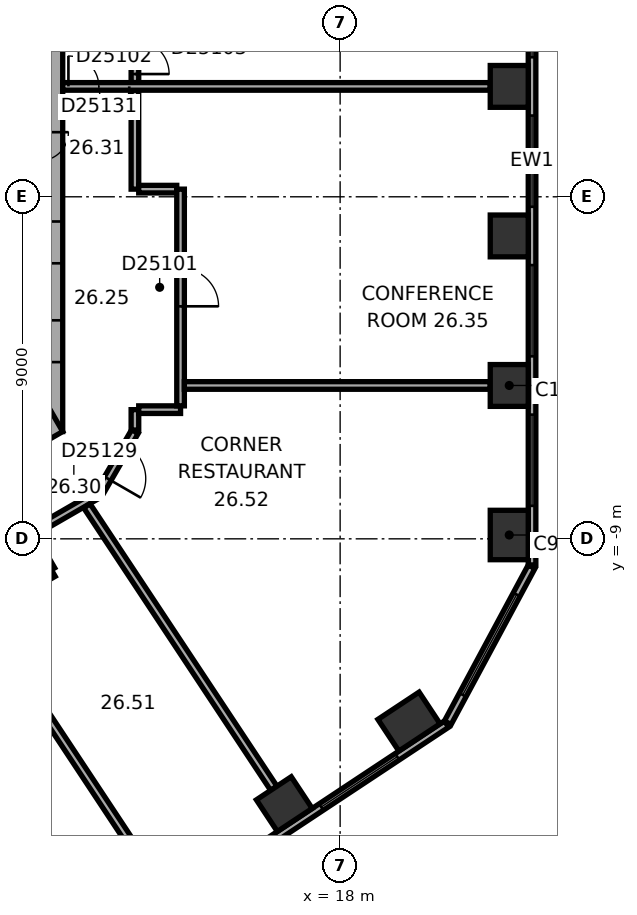
"""IFC4 building model, lengths in metres.
Left out: names, types, materials, properties, quantities, classifications, styles, units other than length and angle.
Written with IfcOpenShell. Run it as: python <this file> out.ifc"""

import sys

from ifc_helpers import new_model, si_unit, direction, frame, frame_2d, origin, origin_2d, place, context, subcontext, project, spatial, rectangle, extrude, element, fill, save


model = new_model("IFC4")
c1 = context("Model", 3, precision=1e-05, world=origin(), true_north=direction((0.0, 1.0)))
c2 = subcontext(c1, "Body", "Model", "MODEL_VIEW")
j1 = project(units=[si_unit("LENGTHUNIT", "METRE"), si_unit("PLANEANGLEUNIT", "RADIAN")], contexts=[c1])
p1 = place(None, origin())
s1 = spatial("IfcSite", under=j1, at=p1, CompositionType="ELEMENT")
p2 = place(p1, origin())
s2 = spatial("IfcBuilding", under=s1, at=p2, CompositionType="ELEMENT")
p3 = place(p2, frame((0.0, 0.0, 110.0)))
s3 = spatial("IfcBuildingStorey", under=s2, at=p3, CompositionType="ELEMENT", Elevation=110.0)
p4 = place(p3, frame((22.45, -8.899, 0.0), z_axis=(0.0, 0.0, 1.0), x_axis=(0.0, 1.0, 0.0)))
e1 = element("IfcColumn", 1, at=p4, inside=s3, PredefinedType="COLUMN", context=c2, shape_type="SweptSolid", body=[
    extrude(rectangle(XDim=1.3, YDim=1.0, at=origin_2d()), origin(), (0.0, 0.0, 1.0), 3.3),
])
for number, where, z_axis, x_axis in (
    (2, (22.45, -4.965, 0.0), (0.0, 0.0, 1.0), (0.0, 1.0, 0.0)),
    (3, (22.45, -1.03, 0.0), (0.0, 0.0, 1.0), (0.0, 1.0, 0.0)),
    (4, (22.45, 2.905, 0.0), (0.0, 0.0, 1.0), (0.0, 1.0, 0.0)),
    (5, (16.531, -15.981, 0.0), (0.0, 0.0, 1.0), (0.834, 0.552, 0.0)),
):
    element("IfcColumn", number, at=place(p3, frame(where, z_axis=z_axis, x_axis=x_axis)), inside=s3, PredefinedType="COLUMN", context=c2, shape_type="SweptSolid", body=[
        extrude(rectangle(XDim=1.1, YDim=1.0, at=origin_2d()), origin(), (0.0, 0.0, 1.0), 3.3),
    ])
p5 = place(p3, frame((19.812, -13.809, 0.0), z_axis=(0.0, 0.0, 1.0), x_axis=(0.833885822067, 0.551936985312, 0.0)))
e6 = element("IfcColumn", 6, at=p5, inside=s3, PredefinedType="COLUMN", context=c2, shape_type="SweptSolid", body=[
    extrude(rectangle(XDim=1.3, YDim=1.0, at=origin_2d()), origin(), (0.0, 0.0, 1.0), 3.3),
])
p6 = place(p3, frame((10.1, -6.177, 0.0), z_axis=(0.0, 0.0, 1.0), x_axis=(0.0, 1.0, 0.0)))
e7 = element("IfcWall", 7, at=p6, inside=s3, PredefinedType="SHEAR", context=c2, shape_type="SweptSolid", body=[
    extrude(rectangle(XDim=12.355, YDim=1.2, at=frame_2d((6.177, 0.0))), origin(), (0.0, 0.0, 1.0), 3.3),
])
p7 = place(p6, frame((6.378, 0.0, 0.0)))
e8 = element("IfcOpeningElement", 8, at=p7, cuts=e7, PredefinedType="OPENING", context=c2, shape_type="SweptSolid", body=[
    extrude(rectangle(XDim=1.5, YDim=2.1, at=frame_2d((0.75, 1.05))), frame((0.0, 0.61, 0.0), z_axis=(0.0, -1.0, 0.0), x_axis=(1.0, 0.0, 0.0)), (0.0, 0.0, 1.0), 1.22),
])
p8 = place(p6, frame((1.828, 0.0, 0.0)))
e9 = element("IfcOpeningElement", 9, at=p8, cuts=e7, PredefinedType="OPENING", context=c2, shape_type="SweptSolid", body=[
    extrude(rectangle(XDim=1.1, YDim=2.1, at=frame_2d((0.55, 1.05))), frame((0.0, 0.61, 0.0), z_axis=(0.0, -1.0, 0.0), x_axis=(1.0, 0.0, 0.0)), (0.0, 0.0, 1.0), 1.22),
])
p9 = place(p6, frame((4.427, 0.0, 0.0)))
e10 = element("IfcOpeningElement", 10, at=p9, cuts=e7, PredefinedType="OPENING", context=c2, shape_type="SweptSolid", body=[
    extrude(rectangle(XDim=1.1, YDim=2.1, at=frame_2d((0.55, 1.05))), frame((0.0, 0.61, 0.0), z_axis=(0.0, -1.0, 0.0), x_axis=(1.0, 0.0, 0.0)), (0.0, 0.0, 1.0), 1.22),
])
p10 = place(p3, frame((-0.3, -11.836, 0.0), z_axis=(0.0, 0.0, 1.0), x_axis=(0.866021384402, 0.500006961711, 0.0)))
e11 = element("IfcWall", 11, at=p10, inside=s3, PredefinedType="SHEAR", context=c2, shape_type="SweptSolid", body=[
    extrude(rectangle(XDim=12.355, YDim=1.2, at=frame_2d((6.178, 0.0))), origin(), (0.0, 0.0, 1.0), 3.3),
])
p11 = place(p10, frame((4.128, 0.0, 0.0)))
e12 = element("IfcOpeningElement", 12, at=p11, cuts=e11, PredefinedType="OPENING", context=c2, shape_type="SweptSolid", body=[
    extrude(rectangle(XDim=0.9, YDim=2.1, at=frame_2d((0.45, 1.05))), frame((0.0, 0.61, 0.0), z_axis=(0.0, -1.0, 0.0), x_axis=(1.0, 0.0, 0.0)), (0.0, 0.0, 1.0), 1.22),
])
p12 = place(p10, frame((7.928, 0.0, 0.0)))
e13 = element("IfcOpeningElement", 13, at=p12, cuts=e11, PredefinedType="OPENING", context=c2, shape_type="SweptSolid", body=[
    extrude(rectangle(XDim=1.1, YDim=2.1, at=frame_2d((0.55, 1.05))), frame((0.0, 0.61, 0.0), z_axis=(0.0, -1.0, 0.0), x_axis=(1.0, 0.0, 0.0)), (0.0, 0.0, 1.0), 1.22),
])
p13 = place(p3, frame((23.05, -9.687, 0.0), z_axis=(0.0, 0.0, 1.0), x_axis=(0.0, 1.0, 0.0)))
e14 = element("IfcWall", 14, at=p13, inside=s3, PredefinedType="STANDARD", context=c2, shape_type="SweptSolid", body=[
    extrude(rectangle(XDim=21.246, YDim=0.2, at=frame_2d((10.623, 0.0))), origin(), (0.0, 0.0, 1.0), 3.3),
])
p14 = place(p13, frame((1.555, 0.0, 0.8)))
e15 = element("IfcOpeningElement", 15, at=p14, cuts=e14, PredefinedType="OPENING", context=c2, shape_type="SweptSolid", body=[
    extrude(rectangle(XDim=2.4, YDim=1.7, at=frame_2d((1.2, 0.85))), frame((0.0, 0.11, 0.0), z_axis=(0.0, -1.0, 0.0), x_axis=(1.0, 0.0, 0.0)), (0.0, 0.0, 1.0), 0.22),
])
p15 = place(p13, frame((5.489, 0.0, 0.8)))
e16 = element("IfcOpeningElement", 16, at=p15, cuts=e14, PredefinedType="OPENING", context=c2, shape_type="SweptSolid", body=[
    extrude(rectangle(XDim=2.4, YDim=1.7, at=frame_2d((1.2, 0.85))), frame((0.0, 0.11, 0.0), z_axis=(0.0, -1.0, 0.0), x_axis=(1.0, 0.0, 0.0)), (0.0, 0.0, 1.0), 0.22),
])
p16 = place(p13, frame((9.424, 0.0, 0.8)))
e17 = element("IfcOpeningElement", 17, at=p16, cuts=e14, PredefinedType="OPENING", context=c2, shape_type="SweptSolid", body=[
    extrude(rectangle(XDim=2.4, YDim=1.7, at=frame_2d((1.2, 0.85))), frame((0.0, 0.11, 0.0), z_axis=(0.0, -1.0, 0.0), x_axis=(1.0, 0.0, 0.0)), (0.0, 0.0, 1.0), 0.22),
])
p17 = place(p13, frame((13.358, 0.0, 0.8)))
e18 = element("IfcOpeningElement", 18, at=p17, cuts=e14, PredefinedType="OPENING", context=c2, shape_type="SweptSolid", body=[
    extrude(rectangle(XDim=2.4, YDim=1.7, at=frame_2d((1.2, 0.85))), frame((0.0, 0.11, 0.0), z_axis=(0.0, -1.0, 0.0), x_axis=(1.0, 0.0, 0.0)), (0.0, 0.0, 1.0), 0.22),
])
p18 = place(p13, frame((17.293, 0.0, 0.8)))
e19 = element("IfcOpeningElement", 19, at=p18, cuts=e14, PredefinedType="OPENING", context=c2, shape_type="SweptSolid", body=[
    extrude(rectangle(XDim=2.4, YDim=1.7, at=frame_2d((1.2, 0.85))), frame((0.0, 0.11, 0.0), z_axis=(0.0, -1.0, 0.0), x_axis=(1.0, 0.0, 0.0)), (0.0, 0.0, 1.0), 0.22),
])
p19 = place(p3, frame((3.083, -25.601, 0.0), z_axis=(0.0, 0.0, 1.0), x_axis=(0.833884295743, 0.551939291329, 0.0)))
e20 = element("IfcWall", 20, at=p19, inside=s3, PredefinedType="STANDARD", context=c2, shape_type="SweptSolid", body=[
    extrude(rectangle(XDim=21.246, YDim=0.2, at=frame_2d((10.623, 0.0))), origin(), (0.0, 0.0, 1.0), 3.3),
])
p20 = place(p19, frame((1.553, 0.0, 0.8)))
e21 = element("IfcOpeningElement", 21, at=p20, cuts=e20, PredefinedType="OPENING", context=c2, shape_type="SweptSolid", body=[
    extrude(rectangle(XDim=2.4, YDim=1.7, at=frame_2d((1.2, 0.85))), frame((0.0, 0.11, 0.0), z_axis=(0.0, -1.0, 0.0), x_axis=(1.0, 0.0, 0.0)), (0.0, 0.0, 1.0), 0.22),
])
p21 = place(p19, frame((5.488, 0.0, 0.8)))
e22 = element("IfcOpeningElement", 22, at=p21, cuts=e20, PredefinedType="OPENING", context=c2, shape_type="SweptSolid", body=[
    extrude(rectangle(XDim=2.4, YDim=1.7, at=frame_2d((1.2, 0.85))), frame((0.0, 0.11, 0.0), z_axis=(0.0, -1.0, 0.0), x_axis=(1.0, 0.0, 0.0)), (0.0, 0.0, 1.0), 0.22),
])
p22 = place(p19, frame((9.422, 0.0, 0.8)))
e23 = element("IfcOpeningElement", 23, at=p22, cuts=e20, PredefinedType="OPENING", context=c2, shape_type="SweptSolid", body=[
    extrude(rectangle(XDim=2.4, YDim=1.7, at=frame_2d((1.2, 0.85))), frame((0.0, 0.11, 0.0), z_axis=(0.0, -1.0, 0.0), x_axis=(1.0, 0.0, 0.0)), (0.0, 0.0, 1.0), 0.22),
])
p23 = place(p19, frame((13.357, 0.0, 0.8)))
e24 = element("IfcOpeningElement", 24, at=p23, cuts=e20, PredefinedType="OPENING", context=c2, shape_type="SweptSolid", body=[
    extrude(rectangle(XDim=2.4, YDim=1.7, at=frame_2d((1.2, 0.85))), frame((0.0, 0.11, 0.0), z_axis=(0.0, -1.0, 0.0), x_axis=(1.0, 0.0, 0.0)), (0.0, 0.0, 1.0), 0.22),
])
p24 = place(p19, frame((17.291, 0.0, 0.8)))
e25 = element("IfcOpeningElement", 25, at=p24, cuts=e20, PredefinedType="OPENING", context=c2, shape_type="SweptSolid", body=[
    extrude(rectangle(XDim=2.4, YDim=1.7, at=frame_2d((1.2, 0.85))), frame((0.0, 0.11, 0.0), z_axis=(0.0, -1.0, 0.0), x_axis=(1.0, 0.0, 0.0)), (0.0, 0.0, 1.0), 0.22),
])
p25 = place(p3, frame((20.833, -13.839, 0.0), z_axis=(0.0, 0.0, 1.0), x_axis=(0.473321668581, 0.880889662813, 0.0)))
e26 = element("IfcWall", 26, at=p25, inside=s3, PredefinedType="STANDARD", context=c2, shape_type="SweptSolid", body=[
    extrude(rectangle(XDim=4.66, YDim=0.2, at=frame_2d((2.33, 0.0))), origin(), (0.0, 0.0, 1.0), 3.3),
])
p26 = place(p25, frame((0.83, 0.0, 0.8)))
e27 = element("IfcOpeningElement", 27, at=p26, cuts=e26, PredefinedType="OPENING", context=c2, shape_type="SweptSolid", body=[
    extrude(rectangle(XDim=3.0, YDim=1.7, at=frame_2d((1.5, 0.85))), frame((0.0, 0.11, 0.0), z_axis=(0.0, -1.0, 0.0), x_axis=(1.0, 0.0, 0.0)), (0.0, 0.0, 1.0), 0.22),
])
p27 = place(p3, frame((7.419, -11.653, 0.0), z_axis=(0.0, 0.0, 1.0), x_axis=(0.866038154057, 0.49997791523, 0.0)))
e28 = element("IfcWall", 28, at=p27, inside=s3, PredefinedType="PARTITIONING", context=c2, shape_type="SweptSolid", body=[
    extrude(rectangle(XDim=3.502, YDim=0.2, at=frame_2d((1.751, 0.0))), origin(), (0.0, 0.0, 1.0), 3.05),
])
p28 = place(p27, frame((1.94, 0.0, 0.0)))
e29 = element("IfcOpeningElement", 29, at=p28, cuts=e28, PredefinedType="OPENING", context=c2, shape_type="SweptSolid", body=[
    extrude(rectangle(XDim=0.9, YDim=2.1, at=frame_2d((0.45, 1.05))), frame((0.0, 0.11, 0.0), z_axis=(0.0, -1.0, 0.0), x_axis=(1.0, 0.0, 0.0)), (0.0, 0.0, 1.0), 0.22),
])
p29 = place(p3, frame((9.852, -8.861, 0.0), z_axis=(0.0, 0.0, 1.0), x_axis=(0.866013291437, 0.500020978615, 0.0)))
e30 = element("IfcWall", 30, at=p29, inside=s3, PredefinedType="PARTITIONING", context=c2, shape_type="SweptSolid", body=[
    extrude(rectangle(XDim=2.077, YDim=0.2, at=frame_2d((1.038, 0.0))), origin(), (0.0, 0.0, 1.0), 3.05),
])
p30 = place(p3, frame((10.402, -9.815, 0.0), z_axis=(0.0, 0.0, 1.0), x_axis=(-0.499968756647, 0.866043441391, 0.0)))
e31 = element("IfcWall", 31, at=p30, inside=s3, PredefinedType="PARTITIONING", context=c2, shape_type="SweptSolid", body=[
    extrude(rectangle(XDim=1.001, YDim=0.2, at=frame_2d((0.5, 0.0))), origin(), (0.0, 0.0, 1.0), 3.05),
])
p31 = place(p3, frame((11.67, -7.788, 0.0), z_axis=(0.0, 0.0, 1.0), x_axis=(0.500063286585, 0.865988862174, 0.0)))
e32 = element("IfcWall", 32, at=p31, inside=s3, PredefinedType="PARTITIONING", context=c2, shape_type="SweptSolid", body=[
    extrude(rectangle(XDim=1.86, YDim=0.2, at=frame_2d((0.93, 0.0))), origin(), (0.0, 0.0, 1.0), 3.05),
])
p32 = place(p31, frame((0.43, 0.0, 0.0)))
e33 = element("IfcOpeningElement", 33, at=p32, cuts=e32, PredefinedType="OPENING", context=c2, shape_type="SweptSolid", body=[
    extrude(rectangle(XDim=1.0, YDim=2.1, at=frame_2d((0.5, 1.05))), frame((0.0, 0.11, 0.0), z_axis=(0.0, -1.0, 0.0), x_axis=(1.0, 0.0, 0.0)), (0.0, 0.0, 1.0), 0.22),
])
p33 = place(p3, frame((12.6, -6.138, 0.0), z_axis=(0.0, 0.0, 1.0), x_axis=(0.0, 1.0, 0.0)))
e34 = element("IfcWall", 34, at=p33, inside=s3, PredefinedType="PARTITIONING", context=c2, shape_type="SweptSolid", body=[
    extrude(rectangle(XDim=0.537, YDim=0.2, at=frame_2d((0.268, 0.0))), origin(), (0.0, 0.0, 1.0), 3.05),
])
p34 = place(p3, frame((12.6, 0.201, 0.0), z_axis=(0.0, 0.0, 1.0), x_axis=(0.0, 1.0, 0.0)))
e35 = element("IfcWall", 35, at=p34, inside=s3, PredefinedType="PARTITIONING", context=c2, shape_type="SweptSolid", body=[
    extrude(rectangle(XDim=2.604, YDim=0.2, at=frame_2d((1.302, 0.0))), origin(), (0.0, 0.0, 1.0), 3.05),
])
p35 = place(p3, frame((12.6, 3.004, 0.0), z_axis=(0.0, 0.0, 1.0), x_axis=(0.0, 1.0, 0.0)))
e36 = element("IfcWall", 36, at=p35, inside=s3, PredefinedType="PARTITIONING", context=c2, shape_type="SweptSolid", body=[
    extrude(rectangle(XDim=3.173, YDim=0.2, at=frame_2d((1.586, 0.0))), origin(), (0.0, 0.0, 1.0), 3.05),
])
p36 = place(p35, frame((0.225, 0.0, 0.0)))
e37 = element("IfcOpeningElement", 37, at=p36, cuts=e36, PredefinedType="OPENING", context=c2, shape_type="SweptSolid", body=[
    extrude(rectangle(XDim=0.9, YDim=2.1, at=frame_2d((0.45, 1.05))), frame((0.0, 0.11, 0.0), z_axis=(0.0, -1.0, 0.0), x_axis=(1.0, 0.0, 0.0)), (0.0, 0.0, 1.0), 0.22),
])
p37 = place(p3, frame((12.7, -5.601, 0.0), z_axis=(0.0, 0.0, 1.0), x_axis=(1.0, 0.0, 0.0)))
e38 = element("IfcWall", 38, at=p37, inside=s3, PredefinedType="PARTITIONING", context=c2, shape_type="SweptSolid", body=[
    extrude(rectangle(XDim=1.101, YDim=0.2, at=frame_2d((0.551, 0.0))), origin(), (0.0, 0.0, 1.0), 3.05),
])
p38 = place(p3, frame((12.974, -17.735, 0.0), z_axis=(0.0, 0.0, 1.0), x_axis=(-0.55192625685, 0.833892922982, 0.0)))
e39 = element("IfcWall", 39, at=p38, inside=s3, PredefinedType="PARTITIONING", context=c2, shape_type="SweptSolid", body=[
    extrude(rectangle(XDim=7.95, YDim=0.2, at=frame_2d((3.975, 0.0))), origin(), (0.0, 0.0, 1.0), 3.05),
])
p39 = place(p3, frame((13.701, 0.201, 0.0), z_axis=(0.0, 0.0, 1.0), x_axis=(-1.0, 0.0, 0.0)))
e40 = element("IfcWall", 40, at=p39, inside=s3, PredefinedType="PARTITIONING", context=c2, shape_type="SweptSolid", body=[
    extrude(rectangle(XDim=1.001, YDim=0.2, at=frame_2d((0.5, 0.0))), origin(), (0.0, 0.0, 1.0), 3.05),
])
p40 = place(p3, frame((13.801, -5.501, 0.0), z_axis=(0.0, 0.0, 1.0), x_axis=(0.0, 1.0, 0.0)))
e41 = element("IfcWall", 41, at=p40, inside=s3, PredefinedType="PARTITIONING", context=c2, shape_type="SweptSolid", body=[
    extrude(rectangle(XDim=5.702, YDim=0.2, at=frame_2d((2.851, 0.0))), origin(), (0.0, 0.0, 1.0), 3.05),
])
p41 = place(p40, frame((2.619, 0.0, 0.0)))
e42 = element("IfcOpeningElement", 42, at=p41, cuts=e41, PredefinedType="OPENING", context=c2, shape_type="SweptSolid", body=[
    extrude(rectangle(XDim=1.0, YDim=2.1, at=frame_2d((0.5, 1.05))), frame((0.0, 0.11, 0.0), z_axis=(0.0, -1.0, 0.0), x_axis=(1.0, 0.0, 0.0)), (0.0, 0.0, 1.0), 0.22),
])
p42 = place(p3, frame((13.901, -4.965, 0.0), z_axis=(0.0, 0.0, 1.0), x_axis=(1.0, 0.0, 0.0)))
e43 = element("IfcWall", 43, at=p42, inside=s3, PredefinedType="PARTITIONING", context=c2, shape_type="SweptSolid", body=[
    extrude(rectangle(XDim=8.049, YDim=0.2, at=frame_2d((4.024, 0.0))), origin(), (0.0, 0.0, 1.0), 3.05),
])
p43 = place(p3, frame((16.255, -15.564, 0.0), z_axis=(0.0, 0.0, 1.0), x_axis=(-0.55192208744, 0.833895682562, 0.0)))
e44 = element("IfcWall", 44, at=p43, inside=s3, PredefinedType="PARTITIONING", context=c2, shape_type="SweptSolid", body=[
    extrude(rectangle(XDim=8.913, YDim=0.2, at=frame_2d((4.457, 0.0))), origin(), (0.0, 0.0, 1.0), 2.6),
])
p44 = place(p3, frame((21.95, 2.905, 0.0), z_axis=(0.0, 0.0, 1.0), x_axis=(-1.0, 0.0, 0.0)))
e45 = element("IfcWall", 45, at=p44, inside=s3, PredefinedType="PARTITIONING", context=c2, shape_type="SweptSolid", body=[
    extrude(rectangle(XDim=11.25, YDim=0.2, at=frame_2d((5.625, 0.0))), origin(), (0.0, 0.0, 1.0), 3.05),
])
p45 = place(p44, frame((9.5, 0.0, 0.0)))
e46 = element("IfcOpeningElement", 46, at=p45, cuts=e45, PredefinedType="OPENING", context=c2, shape_type="SweptSolid", body=[
    extrude(rectangle(XDim=1.6, YDim=2.1, at=frame_2d((0.8, 1.05))), frame((0.0, 0.11, 0.0), z_axis=(0.0, -1.0, 0.0), x_axis=(1.0, 0.0, 0.0)), (0.0, 0.0, 1.0), 0.22),
])
p46 = place(p14, origin())
e47 = element("IfcWindow", 47, at=p46, inside=s3, PartitioningType="SINGLE_PANEL", PredefinedType="WINDOW", context=c2, shape_type="SweptSolid", body=[
    extrude(rectangle(XDim=2.4, YDim=1.7, at=frame_2d((1.2, 0.85))), frame((0.0, 0.03, 0.0), z_axis=(0.0, -1.0, 0.0), x_axis=(1.0, 0.0, 0.0)), (0.0, 0.0, 1.0), 0.06),
])
fill(e15, e47)
p47 = place(p15, origin())
e48 = element("IfcWindow", 48, at=p47, inside=s3, PartitioningType="SINGLE_PANEL", PredefinedType="WINDOW", context=c2, shape_type="SweptSolid", body=[
    extrude(rectangle(XDim=2.4, YDim=1.7, at=frame_2d((1.2, 0.85))), frame((0.0, 0.03, 0.0), z_axis=(0.0, -1.0, 0.0), x_axis=(1.0, 0.0, 0.0)), (0.0, 0.0, 1.0), 0.06),
])
fill(e16, e48)
p48 = place(p16, origin())
e49 = element("IfcWindow", 49, at=p48, inside=s3, PartitioningType="SINGLE_PANEL", PredefinedType="WINDOW", context=c2, shape_type="SweptSolid", body=[
    extrude(rectangle(XDim=2.4, YDim=1.7, at=frame_2d((1.2, 0.85))), frame((0.0, 0.03, 0.0), z_axis=(0.0, -1.0, 0.0), x_axis=(1.0, 0.0, 0.0)), (0.0, 0.0, 1.0), 0.06),
])
fill(e17, e49)
p49 = place(p17, origin())
e50 = element("IfcWindow", 50, at=p49, inside=s3, PartitioningType="SINGLE_PANEL", PredefinedType="WINDOW", context=c2, shape_type="SweptSolid", body=[
    extrude(rectangle(XDim=2.4, YDim=1.7, at=frame_2d((1.2, 0.85))), frame((0.0, 0.03, 0.0), z_axis=(0.0, -1.0, 0.0), x_axis=(1.0, 0.0, 0.0)), (0.0, 0.0, 1.0), 0.06),
])
fill(e18, e50)
p50 = place(p24, origin())
e51 = element("IfcWindow", 51, at=p50, inside=s3, PartitioningType="SINGLE_PANEL", PredefinedType="WINDOW", context=c2, shape_type="SweptSolid", body=[
    extrude(rectangle(XDim=2.4, YDim=1.7, at=frame_2d((1.2, 0.85))), frame((0.0, 0.03, 0.0), z_axis=(0.0, -1.0, 0.0), x_axis=(1.0, 0.0, 0.0)), (0.0, 0.0, 1.0), 0.06),
])
fill(e25, e51)
p51 = place(p26, origin())
e52 = element("IfcWindow", 52, at=p51, inside=s3, PartitioningType="SINGLE_PANEL", PredefinedType="WINDOW", context=c2, shape_type="SweptSolid", body=[
    extrude(rectangle(XDim=3.0, YDim=1.7, at=frame_2d((1.5, 0.85))), frame((0.0, 0.03, 0.0), z_axis=(0.0, -1.0, 0.0), x_axis=(1.0, 0.0, 0.0)), (0.0, 0.0, 1.0), 0.06),
])
fill(e27, e52)
p52 = place(p41, origin())
e53 = element("IfcDoor", 53, at=p52, inside=s3, OperationType="SINGLE_SWING_LEFT", PredefinedType="DOOR", context=c2, shape_type="SweptSolid", body=[
    extrude(rectangle(XDim=1.0, YDim=2.1, at=frame_2d((0.5, 1.05))), frame((0.0, 0.025, 0.0), z_axis=(0.0, -1.0, 0.0), x_axis=(1.0, 0.0, 0.0)), (0.0, 0.0, 1.0), 0.05),
])
fill(e42, e53)
p53 = place(p36, origin())
e54 = element("IfcDoor", 54, at=p53, inside=s3, OperationType="SINGLE_SWING_LEFT", PredefinedType="DOOR", context=c2, shape_type="SweptSolid", body=[
    extrude(rectangle(XDim=0.9, YDim=2.1, at=frame_2d((0.45, 1.05))), frame((0.0, 0.025, 0.0), z_axis=(0.0, -1.0, 0.0), x_axis=(1.0, 0.0, 0.0)), (0.0, 0.0, 1.0), 0.05),
])
fill(e37, e54)
p54 = place(p32, origin())
e55 = element("IfcDoor", 55, at=p54, inside=s3, OperationType="SINGLE_SWING_LEFT", PredefinedType="DOOR", context=c2, shape_type="SweptSolid", body=[
    extrude(rectangle(XDim=1.0, YDim=2.1, at=frame_2d((0.5, 1.05))), frame((0.0, 0.025, 0.0), z_axis=(0.0, -1.0, 0.0), x_axis=(1.0, 0.0, 0.0)), (0.0, 0.0, 1.0), 0.05),
])
fill(e33, e55)
p55 = place(p45, origin())
e56 = element("IfcDoor", 56, at=p55, inside=s3, OperationType="DOUBLE_DOOR_SINGLE_SWING", PredefinedType="DOOR", context=c2, shape_type="SweptSolid", body=[
    extrude(rectangle(XDim=1.6, YDim=2.1, at=frame_2d((0.8, 1.05))), frame((0.0, 0.025, 0.0), z_axis=(0.0, -1.0, 0.0), x_axis=(1.0, 0.0, 0.0)), (0.0, 0.0, 1.0), 0.05),
])
fill(e46, e56)
save(model, sys.argv[1])
